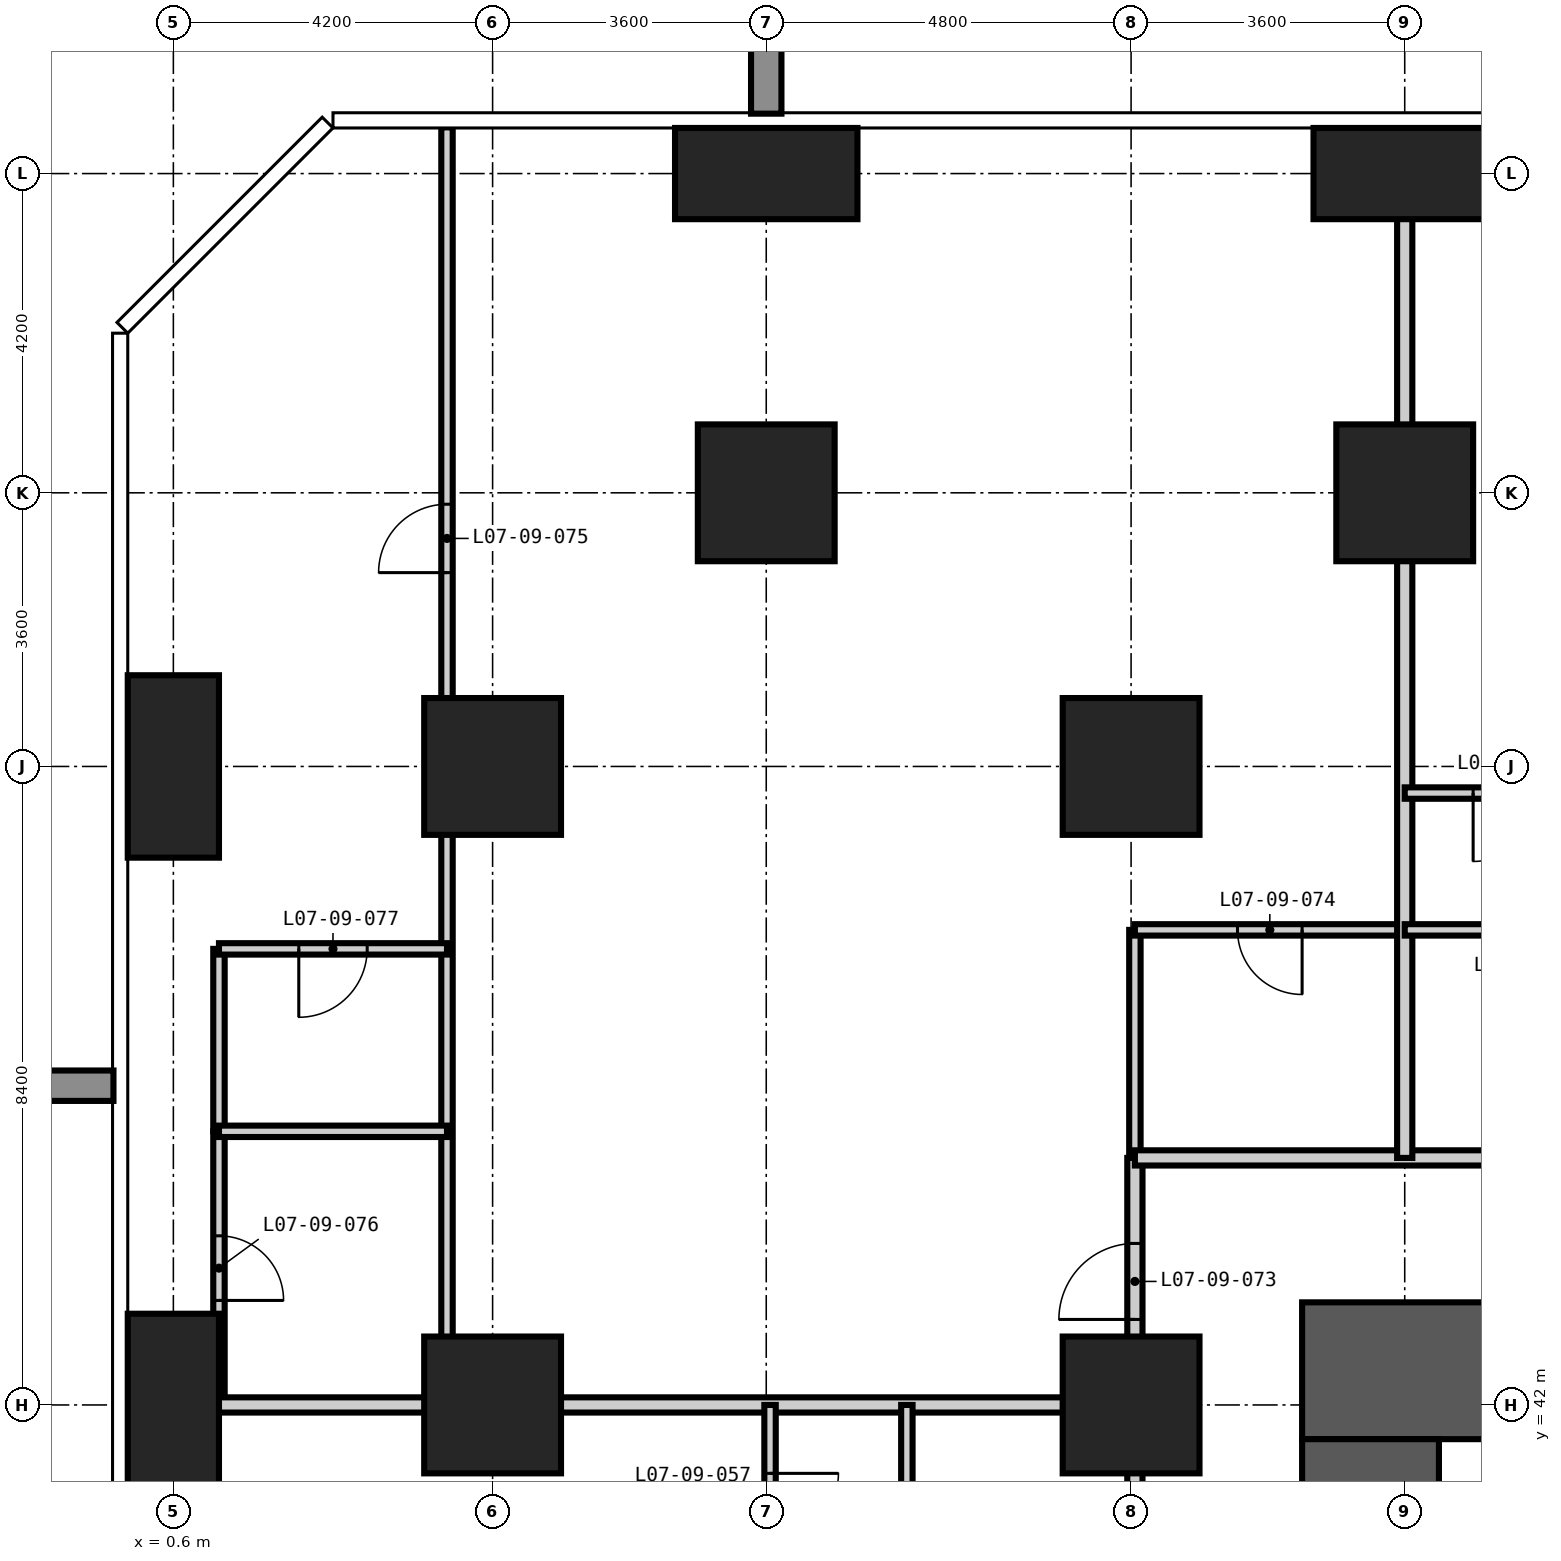
"""IFC4 building model, lengths in metres.
Left out: names, types, materials, properties, quantities, classifications, styles, units other than length and angle.
Written with IfcOpenShell. Run it as: python <this file> out.ifc"""

import sys

from ifc_helpers import new_model, si_unit, direction, frame, frame_2d, origin, origin_2d, place, context, subcontext, project, spatial, rectangle, extrude, element, fill, save


model = new_model("IFC4")
c1 = context("Model", 3, precision=1e-05, world=origin(), true_north=direction((0.0, 1.0)))
c2 = subcontext(c1, "Body", "Model", "MODEL_VIEW")
j1 = project(units=[si_unit("LENGTHUNIT", "METRE"), si_unit("PLANEANGLEUNIT", "RADIAN")], contexts=[c1])
p1 = place(None, origin())
s1 = spatial("IfcSite", under=j1, at=p1, CompositionType="ELEMENT")
p2 = place(p1, origin())
s2 = spatial("IfcBuilding", under=s1, at=p2, CompositionType="ELEMENT")
p3 = place(p2, frame((0.0, 0.0, 34.2)))
s3 = spatial("IfcBuildingStorey", under=s2, at=p3, CompositionType="ELEMENT", Elevation=34.2)
for number, where, z_axis, x_axis in (
    (1, (0.6, 42.0, -0.35), (0.0, 0.0, 1.0), (1.0, 0.0, 0.0)),
    (2, (0.6, 50.4, -0.35), (0.0, 0.0, 1.0), (1.0, 0.0, 0.0)),
):
    element("IfcColumn", number, at=place(p3, frame(where, z_axis=z_axis, x_axis=x_axis)), inside=s3, PredefinedType="COLUMN", context=c2, shape_type="SweptSolid", body=[
        extrude(rectangle(XDim=1.2, YDim=2.4, at=origin_2d()), origin(), (0.0, 0.0, 1.0), 3.6),
    ])
for number, where, z_axis, x_axis in (
    (3, (4.8, 42.0, -0.35), (0.0, 0.0, 1.0), (1.0, 0.0, 0.0)),
    (4, (4.8, 50.4, -0.35), (0.0, 0.0, 1.0), (1.0, 0.0, 0.0)),
    (5, (8.4, 54.0, -0.35), (0.0, 0.0, 1.0), (1.0, 0.0, 0.0)),
):
    element("IfcColumn", number, at=place(p3, frame(where, z_axis=z_axis, x_axis=x_axis)), inside=s3, PredefinedType="COLUMN", context=c2, shape_type="SweptSolid", body=[
        extrude(rectangle(XDim=1.8, YDim=1.8, at=origin_2d()), origin(), (0.0, 0.0, 1.0), 3.6),
    ])
p4 = place(p3, frame((8.4, 58.2, -0.35), z_axis=(0.0, 0.0, 1.0), x_axis=(1.0, 0.0, 0.0)))
e6 = element("IfcColumn", 6, at=p4, inside=s3, PredefinedType="COLUMN", context=c2, shape_type="SweptSolid", body=[
    extrude(rectangle(XDim=2.4, YDim=1.2, at=origin_2d()), origin(), (0.0, 0.0, 1.0), 3.6),
])
for number, where, z_axis, x_axis in (
    (7, (13.2, 42.0, -0.35), (0.0, 0.0, 1.0), (1.0, 0.0, 0.0)),
    (8, (13.2, 50.4, -0.35), (0.0, 0.0, 1.0), (1.0, 0.0, 0.0)),
    (9, (16.8, 54.0, -0.35), (0.0, 0.0, 1.0), (1.0, 0.0, 0.0)),
):
    element("IfcColumn", number, at=place(p3, frame(where, z_axis=z_axis, x_axis=x_axis)), inside=s3, PredefinedType="COLUMN", context=c2, shape_type="SweptSolid", body=[
        extrude(rectangle(XDim=1.8, YDim=1.8, at=origin_2d()), origin(), (0.0, 0.0, 1.0), 3.6),
    ])
p5 = place(p3, frame((16.8, 58.2, -0.35), z_axis=(0.0, 0.0, 1.0), x_axis=(1.0, 0.0, 0.0)))
e10 = element("IfcColumn", 10, at=p5, inside=s3, PredefinedType="COLUMN", context=c2, shape_type="SweptSolid", body=[
    extrude(rectangle(XDim=2.4, YDim=1.2, at=origin_2d()), origin(), (0.0, 0.0, 1.0), 3.6),
])
p6 = place(p3, frame((43.35, 42.45, -0.35), z_axis=(0.0, 0.0, 1.0), x_axis=(-1.0, 0.0, 0.0)))
e11 = element("IfcWall", 11, at=p6, inside=s3, PredefinedType="SHEAR", context=c2, shape_type="SweptSolid", body=[
    extrude(rectangle(XDim=27.9, YDim=1.8, at=frame_2d((13.95, 0.0))), origin(), (0.0, 0.0, 1.0), 3.6),
])
p7 = place(p6, frame((21.85, 0.0, 0.35)))
e12 = element("IfcOpeningElement", 12, at=p7, cuts=e11, PredefinedType="OPENING", context=c2, shape_type="SweptSolid", body=[
    extrude(rectangle(XDim=1.0, YDim=2.1, at=frame_2d((0.5, 1.05))), frame((0.0, 0.91, 0.0), z_axis=(0.0, -1.0, 0.0), x_axis=(1.0, 0.0, 0.0)), (0.0, 0.0, 1.0), 1.82),
])
p8 = place(p6, frame((11.25, 0.0, 0.35)))
e13 = element("IfcOpeningElement", 13, at=p8, cuts=e11, PredefinedType="OPENING", context=c2, shape_type="SweptSolid", body=[
    extrude(rectangle(XDim=1.2, YDim=2.2, at=frame_2d((0.6, 1.1))), frame((0.0, 0.91, 0.0), z_axis=(0.0, -1.0, 0.0), x_axis=(1.0, 0.0, 0.0)), (0.0, 0.0, 1.0), 1.82),
])
p9 = place(p3, frame((16.35, 41.55, -0.35), z_axis=(0.0, 0.0, 1.0), x_axis=(0.0, -1.0, 0.0)))
e14 = element("IfcWall", 14, at=p9, inside=s3, PredefinedType="SHEAR", context=c2, shape_type="SweptSolid", body=[
    extrude(rectangle(XDim=24.3, YDim=1.8, at=frame_2d((12.15, 0.0))), origin(), (0.0, 0.0, 1.0), 3.6),
])
p10 = place(p9, frame((11.25, 0.0, 0.35)))
e15 = element("IfcOpeningElement", 15, at=p10, cuts=e14, PredefinedType="OPENING", context=c2, shape_type="SweptSolid", body=[
    extrude(rectangle(XDim=1.8, YDim=2.2, at=frame_2d((0.9, 1.1))), frame((0.0, 0.91, 0.0), z_axis=(0.0, -1.0, 0.0), x_axis=(1.0, 0.0, 0.0)), (0.0, 0.0, 1.0), 1.82),
])
p11 = place(p9, frame((20.05, 0.0, 0.35)))
e16 = element("IfcOpeningElement", 16, at=p11, cuts=e14, PredefinedType="OPENING", context=c2, shape_type="SweptSolid", body=[
    extrude(rectangle(XDim=1.0, YDim=2.1, at=frame_2d((0.5, 1.05))), frame((0.0, 0.91, 0.0), z_axis=(0.0, -1.0, 0.0), x_axis=(1.0, 0.0, 0.0)), (0.0, 0.0, 1.0), 1.82),
])
p12 = place(p9, frame((5.35, 0.0, 0.35)))
e17 = element("IfcOpeningElement", 17, at=p12, cuts=e14, PredefinedType="OPENING", context=c2, shape_type="SweptSolid", body=[
    extrude(rectangle(XDim=1.0, YDim=2.1, at=frame_2d((0.5, 1.05))), frame((0.0, 0.91, 0.0), z_axis=(0.0, -1.0, 0.0), x_axis=(1.0, 0.0, 0.0)), (0.0, 0.0, 1.0), 1.82),
])
p13 = place(p3, frame((1.2, 42.0, 0.0), z_axis=(0.0, 0.0, 1.0), x_axis=(0.0, 1.0, 0.0)))
e18 = element("IfcWall", 18, at=p13, inside=s3, PredefinedType="PARTITIONING", context=c2, shape_type="SweptSolid", body=[
    extrude(rectangle(XDim=3.6, YDim=0.15, at=frame_2d((1.8, 0.0))), origin(), (0.0, 0.0, 1.0), 3.25),
])
p14 = place(p13, frame((1.375, 0.0, 0.0)))
e19 = element("IfcOpeningElement", 19, at=p14, cuts=e18, PredefinedType="OPENING", context=c2, shape_type="SweptSolid", body=[
    extrude(rectangle(XDim=0.85, YDim=2.1, at=frame_2d((0.425, 1.05))), frame((0.0, 0.085, 0.0), z_axis=(0.0, -1.0, 0.0), x_axis=(1.0, 0.0, 0.0)), (0.0, 0.0, 1.0), 0.17),
])
p15 = place(p3, frame((13.25, 45.25, 0.0), z_axis=(0.0, 0.0, 1.0), x_axis=(0.0, 1.0, 0.0)))
e20 = element("IfcWall", 20, at=p15, inside=s3, PredefinedType="PARTITIONING", context=c2, shape_type="SweptSolid", body=[
    extrude(rectangle(XDim=3.0, YDim=0.15, at=frame_2d((1.5, 0.0))), origin(), (0.0, 0.0, 1.0), 3.25),
])
p16 = place(p3, frame((13.25, 48.25, 0.0), z_axis=(0.0, 0.0, 1.0), x_axis=(1.0, 0.0, 0.0)))
e21 = element("IfcWall", 21, at=p16, inside=s3, PredefinedType="PARTITIONING", context=c2, shape_type="SweptSolid", body=[
    extrude(rectangle(XDim=3.55, YDim=0.15, at=frame_2d((1.775, 0.0))), origin(), (0.0, 0.0, 1.0), 3.25),
])
p17 = place(p16, frame((1.35, 0.0, 0.0)))
e22 = element("IfcOpeningElement", 22, at=p17, cuts=e21, PredefinedType="OPENING", context=c2, shape_type="SweptSolid", body=[
    extrude(rectangle(XDim=0.85, YDim=2.1, at=frame_2d((0.425, 1.05))), frame((0.0, 0.085, 0.0), z_axis=(0.0, -1.0, 0.0), x_axis=(1.0, 0.0, 0.0)), (0.0, 0.0, 1.0), 0.17),
])
p18 = place(p3, frame((13.25, 13.25, 0.0), z_axis=(0.0, 0.0, 1.0), x_axis=(0.0, 1.0, 0.0)))
e23 = element("IfcWall", 23, at=p18, inside=s3, PredefinedType="PARTITIONING", context=c2, shape_type="SweptSolid", body=[
    extrude(rectangle(XDim=32.0, YDim=0.2, at=frame_2d((16.0, 0.0))), origin(), (0.0, 0.0, 1.0), 3.25),
])
p19 = place(p18, frame((9.35, 0.0, 0.0)))
e24 = element("IfcOpeningElement", 24, at=p19, cuts=e23, PredefinedType="OPENING", context=c2, shape_type="SweptSolid", body=[
    extrude(rectangle(XDim=1.0, YDim=2.2, at=frame_2d((0.5, 1.1))), frame((0.0, 0.11, 0.0), z_axis=(0.0, -1.0, 0.0), x_axis=(1.0, 0.0, 0.0)), (0.0, 0.0, 1.0), 0.22),
])
p20 = place(p18, frame((16.4, 0.0, 0.0)))
e25 = element("IfcOpeningElement", 25, at=p20, cuts=e23, PredefinedType="OPENING", context=c2, shape_type="SweptSolid", body=[
    extrude(rectangle(XDim=1.0, YDim=2.2, at=frame_2d((0.5, 1.1))), frame((0.0, 0.11, 0.0), z_axis=(0.0, -1.0, 0.0), x_axis=(1.0, 0.0, 0.0)), (0.0, 0.0, 1.0), 0.22),
])
p21 = place(p18, frame((23.3, 0.0, 0.0)))
e26 = element("IfcOpeningElement", 26, at=p21, cuts=e23, PredefinedType="OPENING", context=c2, shape_type="SweptSolid", body=[
    extrude(rectangle(XDim=1.0, YDim=2.2, at=frame_2d((0.5, 1.1))), frame((0.0, 0.11, 0.0), z_axis=(0.0, -1.0, 0.0), x_axis=(1.0, 0.0, 0.0)), (0.0, 0.0, 1.0), 0.22),
])
p22 = place(p18, frame((24.8, 0.0, 0.0)))
e27 = element("IfcOpeningElement", 27, at=p22, cuts=e23, PredefinedType="OPENING", context=c2, shape_type="SweptSolid", body=[
    extrude(rectangle(XDim=1.0, YDim=2.2, at=frame_2d((0.5, 1.1))), frame((0.0, 0.11, 0.0), z_axis=(0.0, -1.0, 0.0), x_axis=(1.0, 0.0, 0.0)), (0.0, 0.0, 1.0), 0.22),
])
p23 = place(p18, frame((1.275, 0.0, 0.0)))
e28 = element("IfcOpeningElement", 28, at=p23, cuts=e23, PredefinedType="OPENING", context=c2, shape_type="SweptSolid", body=[
    extrude(rectangle(XDim=1.0, YDim=2.2, at=frame_2d((0.5, 1.1))), frame((0.0, 0.11, 0.0), z_axis=(0.0, -1.0, 0.0), x_axis=(1.0, 0.0, 0.0)), (0.0, 0.0, 1.0), 0.22),
])
p24 = place(p18, frame((29.875, 0.0, 0.0)))
e29 = element("IfcOpeningElement", 29, at=p24, cuts=e23, PredefinedType="OPENING", context=c2, shape_type="SweptSolid", body=[
    extrude(rectangle(XDim=1.0, YDim=2.2, at=frame_2d((0.5, 1.1))), frame((0.0, 0.11, 0.0), z_axis=(0.0, -1.0, 0.0), x_axis=(1.0, 0.0, 0.0)), (0.0, 0.0, 1.0), 0.22),
])
p25 = place(p3, frame((13.25, 45.25, 0.0), z_axis=(0.0, 0.0, 1.0), x_axis=(1.0, 0.0, 0.0)))
e30 = element("IfcWall", 30, at=p25, inside=s3, PredefinedType="PARTITIONING", context=c2, shape_type="SweptSolid", body=[
    extrude(rectangle(XDim=32.6, YDim=0.2, at=frame_2d((16.3, 0.0))), origin(), (0.0, 0.0, 1.0), 3.25),
])
p26 = place(p25, frame((6.5, 0.0, 0.0)))
e31 = element("IfcOpeningElement", 31, at=p26, cuts=e30, PredefinedType="OPENING", context=c2, shape_type="SweptSolid", body=[
    extrude(rectangle(XDim=1.0, YDim=2.2, at=frame_2d((0.5, 1.1))), frame((0.0, 0.11, 0.0), z_axis=(0.0, -1.0, 0.0), x_axis=(1.0, 0.0, 0.0)), (0.0, 0.0, 1.0), 0.22),
])
p27 = place(p25, frame((11.45, 0.0, 0.0)))
e32 = element("IfcOpeningElement", 32, at=p27, cuts=e30, PredefinedType="OPENING", context=c2, shape_type="SweptSolid", body=[
    extrude(rectangle(XDim=1.0, YDim=2.2, at=frame_2d((0.5, 1.1))), frame((0.0, 0.11, 0.0), z_axis=(0.0, -1.0, 0.0), x_axis=(1.0, 0.0, 0.0)), (0.0, 0.0, 1.0), 0.22),
])
p28 = place(p25, frame((19.85, 0.0, 0.0)))
e33 = element("IfcOpeningElement", 33, at=p28, cuts=e30, PredefinedType="OPENING", context=c2, shape_type="SweptSolid", body=[
    extrude(rectangle(XDim=1.0, YDim=2.2, at=frame_2d((0.5, 1.1))), frame((0.0, 0.11, 0.0), z_axis=(0.0, -1.0, 0.0), x_axis=(1.0, 0.0, 0.0)), (0.0, 0.0, 1.0), 0.22),
])
p29 = place(p25, frame((24.8, 0.0, 0.0)))
e34 = element("IfcOpeningElement", 34, at=p29, cuts=e30, PredefinedType="OPENING", context=c2, shape_type="SweptSolid", body=[
    extrude(rectangle(XDim=1.0, YDim=2.2, at=frame_2d((0.5, 1.1))), frame((0.0, 0.11, 0.0), z_axis=(0.0, -1.0, 0.0), x_axis=(1.0, 0.0, 0.0)), (0.0, 0.0, 1.0), 0.22),
])
p30 = place(p3, frame((16.8, 45.25, 0.0), z_axis=(0.0, 0.0, 1.0), x_axis=(0.0, 1.0, 0.0)))
e35 = element("IfcWall", 35, at=p30, inside=s3, PredefinedType="PARTITIONING", context=c2, shape_type="SweptSolid", body=[
    extrude(rectangle(XDim=13.558, YDim=0.2, at=frame_2d((6.779, 0.0))), origin(), (0.0, 0.0, 1.0), 3.25),
])
p31 = place(p3, frame((-0.008, 42.0, 0.0), z_axis=(0.0, 0.0, 1.0), x_axis=(1.0, 0.0, 0.0)))
e36 = element("IfcWall", 36, at=p31, inside=s3, PredefinedType="PARTITIONING", context=c2, shape_type="SweptSolid", body=[
    extrude(rectangle(XDim=13.258, YDim=0.2, at=frame_2d((6.629, 0.0))), origin(), (0.0, 0.0, 1.0), 3.25),
])
p32 = place(p3, frame((1.2, 45.6, 0.0), z_axis=(0.0, 0.0, 1.0), x_axis=(0.0, 1.0, 0.0)))
e37 = element("IfcWall", 37, at=p32, inside=s3, PredefinedType="PARTITIONING", context=c2, shape_type="SweptSolid", body=[
    extrude(rectangle(XDim=2.4, YDim=0.15, at=frame_2d((1.2, 0.0))), origin(), (0.0, 0.0, 1.0), 3.25),
])
p33 = place(p3, frame((4.2, 42.0, 0.0), z_axis=(0.0, 0.0, 1.0), x_axis=(0.0, 1.0, 0.0)))
e38 = element("IfcWall", 38, at=p33, inside=s3, PredefinedType="PARTITIONING", context=c2, shape_type="SweptSolid", body=[
    extrude(rectangle(XDim=16.808, YDim=0.15, at=frame_2d((8.404, 0.0))), origin(), (0.0, 0.0, 1.0), 3.25),
])
p34 = place(p33, frame((10.95, 0.0, 0.0)))
e39 = element("IfcOpeningElement", 39, at=p34, cuts=e38, PredefinedType="OPENING", context=c2, shape_type="SweptSolid", body=[
    extrude(rectangle(XDim=0.9, YDim=2.1, at=frame_2d((0.45, 1.05))), frame((0.0, 0.085, 0.0), z_axis=(0.0, -1.0, 0.0), x_axis=(1.0, 0.0, 0.0)), (0.0, 0.0, 1.0), 0.17),
])
p35 = place(p3, frame((8.45, 39.3, 0.0), z_axis=(0.0, 0.0, 1.0), x_axis=(0.0, 1.0, 0.0)))
e40 = element("IfcWall", 40, at=p35, inside=s3, PredefinedType="PARTITIONING", context=c2, shape_type="SweptSolid", body=[
    extrude(rectangle(XDim=2.7, YDim=0.15, at=frame_2d((1.35, 0.0))), origin(), (0.0, 0.0, 1.0), 3.25),
])
p36 = place(p35, frame((0.9, 0.0, 0.0)))
e41 = element("IfcOpeningElement", 41, at=p36, cuts=e40, PredefinedType="OPENING", context=c2, shape_type="SweptSolid", body=[
    extrude(rectangle(XDim=0.9, YDim=2.1, at=frame_2d((0.45, 1.05))), frame((0.0, 0.085, 0.0), z_axis=(0.0, -1.0, 0.0), x_axis=(1.0, 0.0, 0.0)), (0.0, 0.0, 1.0), 0.17),
])
p37 = place(p3, frame((10.25, 39.3, 0.0), z_axis=(0.0, 0.0, 1.0), x_axis=(0.0, 1.0, 0.0)))
e42 = element("IfcWall", 42, at=p37, inside=s3, PredefinedType="PARTITIONING", context=c2, shape_type="SweptSolid", body=[
    extrude(rectangle(XDim=2.7, YDim=0.15, at=frame_2d((1.35, 0.0))), origin(), (0.0, 0.0, 1.0), 3.25),
])
p38 = place(p3, frame((1.2, 45.6, 0.0), z_axis=(0.0, 0.0, 1.0), x_axis=(1.0, 0.0, 0.0)))
e43 = element("IfcWall", 43, at=p38, inside=s3, PredefinedType="PARTITIONING", context=c2, shape_type="SweptSolid", body=[
    extrude(rectangle(XDim=3.0, YDim=0.15, at=frame_2d((1.5, 0.0))), origin(), (0.0, 0.0, 1.0), 3.25),
])
p39 = place(p3, frame((1.2, 48.0, 0.0), z_axis=(0.0, 0.0, 1.0), x_axis=(1.0, 0.0, 0.0)))
e44 = element("IfcWall", 44, at=p39, inside=s3, PredefinedType="PARTITIONING", context=c2, shape_type="SweptSolid", body=[
    extrude(rectangle(XDim=3.0, YDim=0.15, at=frame_2d((1.5, 0.0))), origin(), (0.0, 0.0, 1.0), 3.25),
])
p40 = place(p39, frame((1.05, 0.0, 0.0)))
e45 = element("IfcOpeningElement", 45, at=p40, cuts=e44, PredefinedType="OPENING", context=c2, shape_type="SweptSolid", body=[
    extrude(rectangle(XDim=0.9, YDim=2.1, at=frame_2d((0.45, 1.05))), frame((0.0, 0.085, 0.0), z_axis=(0.0, -1.0, 0.0), x_axis=(1.0, 0.0, 0.0)), (0.0, 0.0, 1.0), 0.17),
])
p41 = place(p3, frame((16.8, 48.25, 0.0), z_axis=(0.0, 0.0, 1.0), x_axis=(1.0, 0.0, 0.0)))
e46 = element("IfcWall", 46, at=p41, inside=s3, PredefinedType="PARTITIONING", context=c2, shape_type="SweptSolid", body=[
    extrude(rectangle(XDim=2.7, YDim=0.15, at=frame_2d((1.35, 0.0))), origin(), (0.0, 0.0, 1.0), 3.25),
])
p42 = place(p3, frame((16.8, 50.05, 0.0), z_axis=(0.0, 0.0, 1.0), x_axis=(1.0, 0.0, 0.0)))
e47 = element("IfcWall", 47, at=p42, inside=s3, PredefinedType="PARTITIONING", context=c2, shape_type="SweptSolid", body=[
    extrude(rectangle(XDim=2.7, YDim=0.15, at=frame_2d((1.35, 0.0))), origin(), (0.0, 0.0, 1.0), 3.25),
])
p43 = place(p42, frame((0.9, 0.0, 0.0)))
e48 = element("IfcOpeningElement", 48, at=p43, cuts=e47, PredefinedType="OPENING", context=c2, shape_type="SweptSolid", body=[
    extrude(rectangle(XDim=0.9, YDim=2.1, at=frame_2d((0.45, 1.05))), frame((0.0, 0.085, 0.0), z_axis=(0.0, -1.0, 0.0), x_axis=(1.0, 0.0, 0.0)), (0.0, 0.0, 1.0), 0.17),
])
p44 = place(p43, frame((0.9, 0.0, 0.0), z_axis=(0.0, 0.0, 1.0), x_axis=(-1.0, 0.0, 0.0)))
e49 = element("IfcDoor", 49, at=p44, inside=s3, OperationType="SINGLE_SWING_RIGHT", PredefinedType="DOOR", context=c2, shape_type="SweptSolid", body=[
    extrude(rectangle(XDim=0.9, YDim=2.1, at=frame_2d((0.45, 1.05))), frame((0.0, 0.025, 0.0), z_axis=(0.0, -1.0, 0.0), x_axis=(1.0, 0.0, 0.0)), (0.0, 0.0, 1.0), 0.05),
])
fill(e48, e49)
p45 = place(p36, frame((0.9, 0.0, 0.0), z_axis=(0.0, 0.0, 1.0), x_axis=(-1.0, 0.0, 0.0)))
e50 = element("IfcDoor", 50, at=p45, inside=s3, OperationType="SINGLE_SWING_LEFT", PredefinedType="DOOR", context=c2, shape_type="SweptSolid", body=[
    extrude(rectangle(XDim=0.9, YDim=2.1, at=frame_2d((0.45, 1.05))), frame((0.0, 0.025, 0.0), z_axis=(0.0, -1.0, 0.0), x_axis=(1.0, 0.0, 0.0)), (0.0, 0.0, 1.0), 0.05),
])
fill(e41, e50)
p46 = place(p24, origin())
e51 = element("IfcDoor", 51, at=p46, inside=s3, OperationType="SINGLE_SWING_LEFT", PredefinedType="DOOR", context=c2, shape_type="SweptSolid", body=[
    extrude(rectangle(XDim=1.0, YDim=2.2, at=frame_2d((0.5, 1.1))), frame((0.0, 0.025, 0.0), z_axis=(0.0, -1.0, 0.0), x_axis=(1.0, 0.0, 0.0)), (0.0, 0.0, 1.0), 0.05),
])
fill(e29, e51)
p47 = place(p17, frame((0.85, 0.0, 0.0), z_axis=(0.0, 0.0, 1.0), x_axis=(-1.0, 0.0, 0.0)))
e52 = element("IfcDoor", 52, at=p47, inside=s3, OperationType="SINGLE_SWING_LEFT", PredefinedType="DOOR", context=c2, shape_type="SweptSolid", body=[
    extrude(rectangle(XDim=0.85, YDim=2.1, at=frame_2d((0.425, 1.05))), frame((0.0, 0.025, 0.0), z_axis=(0.0, -1.0, 0.0), x_axis=(1.0, 0.0, 0.0)), (0.0, 0.0, 1.0), 0.05),
])
fill(e22, e52)
p48 = place(p34, origin())
e53 = element("IfcDoor", 53, at=p48, inside=s3, OperationType="SINGLE_SWING_LEFT", PredefinedType="DOOR", context=c2, shape_type="SweptSolid", body=[
    extrude(rectangle(XDim=0.9, YDim=2.1, at=frame_2d((0.45, 1.05))), frame((0.0, 0.025, 0.0), z_axis=(0.0, -1.0, 0.0), x_axis=(1.0, 0.0, 0.0)), (0.0, 0.0, 1.0), 0.05),
])
fill(e39, e53)
p49 = place(p14, frame((0.85, 0.0, 0.0), z_axis=(0.0, 0.0, 1.0), x_axis=(-1.0, 0.0, 0.0)))
e54 = element("IfcDoor", 54, at=p49, inside=s3, OperationType="SINGLE_SWING_RIGHT", PredefinedType="DOOR", context=c2, shape_type="SweptSolid", body=[
    extrude(rectangle(XDim=0.85, YDim=2.1, at=frame_2d((0.425, 1.05))), frame((0.0, 0.025, 0.0), z_axis=(0.0, -1.0, 0.0), x_axis=(1.0, 0.0, 0.0)), (0.0, 0.0, 1.0), 0.05),
])
fill(e19, e54)
p50 = place(p40, frame((0.9, 0.0, 0.0), z_axis=(0.0, 0.0, 1.0), x_axis=(-1.0, 0.0, 0.0)))
e55 = element("IfcDoor", 55, at=p50, inside=s3, OperationType="SINGLE_SWING_RIGHT", PredefinedType="DOOR", context=c2, shape_type="SweptSolid", body=[
    extrude(rectangle(XDim=0.9, YDim=2.1, at=frame_2d((0.45, 1.05))), frame((0.0, 0.025, 0.0), z_axis=(0.0, -1.0, 0.0), x_axis=(1.0, 0.0, 0.0)), (0.0, 0.0, 1.0), 0.05),
])
fill(e45, e55)
save(model, sys.argv[1])
